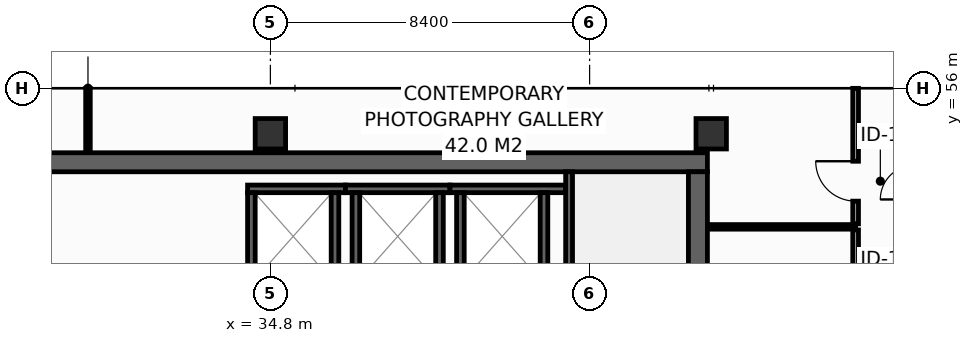
"""IFC4 building model, lengths in metres.
Left out: names, types, materials, properties, quantities, classifications, styles, units other than length and angle.
Written with IfcOpenShell. Run it as: python <this file> out.ifc"""

import sys

from ifc_helpers import new_model, si_unit, direction, frame, frame_2d, origin, origin_2d, place, context, subcontext, project, spatial, rectangle, hollow_rectangle, extrude, element, fill, save


model = new_model("IFC4")
c1 = context("Model", 3, precision=1e-05, world=origin(), true_north=direction((0.0, 1.0)))
c2 = subcontext(c1, "Body", "Model", "MODEL_VIEW")
j1 = project(units=[si_unit("LENGTHUNIT", "METRE"), si_unit("PLANEANGLEUNIT", "RADIAN")], contexts=[c1])
p1 = place(None, origin())
s1 = spatial("IfcSite", under=j1, at=p1, CompositionType="ELEMENT")
p2 = place(p1, origin())
s2 = spatial("IfcBuilding", under=s1, at=p2, CompositionType="ELEMENT")
p3 = place(p2, frame((0.0, 0.0, 205.6)))
s3 = spatial("IfcBuildingStorey", under=s2, at=p3, CompositionType="ELEMENT", Elevation=205.6)
p4 = place(p3, frame((13.6, 54.05, 0.0), z_axis=(0.0, 0.0, 1.0), x_axis=(1.0, 0.0, 0.0)))
e1 = element("IfcWall", 1, at=p4, inside=s3, PredefinedType="SHEAR", context=c2, shape_type="SweptSolid", body=[
    extrude(rectangle(XDim=32.7, YDim=0.5, at=frame_2d((16.35, 0.0))), origin(), (0.0, 0.0, 1.0), 3.55),
])
p5 = place(p3, frame((46.05, 43.4, 0.0), z_axis=(0.0, 0.0, 1.0), x_axis=(0.0, 1.0, 0.0)))
e2 = element("IfcWall", 2, at=p5, inside=s3, PredefinedType="SHEAR", context=c2, shape_type="SweptSolid", body=[
    extrude(rectangle(XDim=10.4, YDim=0.5, at=frame_2d((5.2, 0.0))), origin(), (0.0, 0.0, 1.0), 3.55),
])
for number, where, z_axis, x_axis in (
    (3, (34.8, 54.8, 0.0), (0.0, 0.0, 1.0), (1.0, 0.0, 0.0)),
    (4, (46.4, 54.8, 0.0), (0.0, 0.0, 1.0), (1.0, 0.0, 0.0)),
):
    element("IfcColumn", number, at=place(p3, frame(where, z_axis=z_axis, x_axis=x_axis)), inside=s3, PredefinedType="COLUMN", context=c2, shape_type="SweptSolid", body=[
        extrude(hollow_rectangle(XDim=0.8, YDim=0.8, WallThickness=0.036, at=origin_2d()), origin(), (0.0, 0.0, 1.0), 3.8),
    ])
p6 = place(p3, frame((34.2, 53.35, 0.0), z_axis=(0.0, 0.0, 1.0), x_axis=(1.0, 0.0, 0.0)))
e5 = element("IfcWall", 5, at=p6, inside=s3, PredefinedType="SHEAR", context=c2, shape_type="SweptSolid", body=[
    extrude(rectangle(XDim=2.575, YDim=0.2, at=frame_2d((1.288, 0.0))), origin(), (0.0, 0.0, 1.0), 3.55),
])
for number, where, z_axis, x_axis in (
    (6, (34.3, 50.95, 0.0), (0.0, 0.0, 1.0), (0.0, 1.0, 0.0)),
    (7, (36.5, 50.95, 0.0), (0.0, 0.0, 1.0), (0.0, 1.0, 0.0)),
):
    element("IfcWall", number, at=place(p3, frame(where, z_axis=z_axis, x_axis=x_axis)), inside=s3, PredefinedType="SHEAR", context=c2, shape_type="SweptSolid", body=[
        extrude(rectangle(XDim=2.3, YDim=0.2, at=frame_2d((1.15, 0.0))), origin(), (0.0, 0.0, 1.0), 3.55),
    ])
p7 = place(p3, frame((36.775, 53.35, 0.0), z_axis=(0.0, 0.0, 1.0), x_axis=(1.0, 0.0, 0.0)))
e8 = element("IfcWall", 8, at=p7, inside=s3, PredefinedType="SHEAR", context=c2, shape_type="SweptSolid", body=[
    extrude(rectangle(XDim=2.75, YDim=0.2, at=frame_2d((1.375, 0.0))), origin(), (0.0, 0.0, 1.0), 3.55),
])
for number, where, z_axis, x_axis in (
    (9, (37.05, 50.95, 0.0), (0.0, 0.0, 1.0), (0.0, 1.0, 0.0)),
    (10, (39.25, 50.95, 0.0), (0.0, 0.0, 1.0), (0.0, 1.0, 0.0)),
):
    element("IfcWall", number, at=place(p3, frame(where, z_axis=z_axis, x_axis=x_axis)), inside=s3, PredefinedType="SHEAR", context=c2, shape_type="SweptSolid", body=[
        extrude(rectangle(XDim=2.3, YDim=0.2, at=frame_2d((1.15, 0.0))), origin(), (0.0, 0.0, 1.0), 3.55),
    ])
p8 = place(p3, frame((39.525, 53.35, 0.0), z_axis=(0.0, 0.0, 1.0), x_axis=(1.0, 0.0, 0.0)))
e11 = element("IfcWall", 11, at=p8, inside=s3, PredefinedType="SHEAR", context=c2, shape_type="SweptSolid", body=[
    extrude(rectangle(XDim=3.045, YDim=0.2, at=frame_2d((1.522, 0.0))), origin(), (0.0, 0.0, 1.0), 3.55),
])
for number, where, z_axis, x_axis in (
    (12, (39.8, 50.95, 0.0), (0.0, 0.0, 1.0), (0.0, 1.0, 0.0)),
    (13, (42.0, 50.95, 0.0), (0.0, 0.0, 1.0), (0.0, 1.0, 0.0)),
):
    element("IfcWall", number, at=place(p3, frame(where, z_axis=z_axis, x_axis=x_axis)), inside=s3, PredefinedType="SHEAR", context=c2, shape_type="SweptSolid", body=[
        extrude(rectangle(XDim=2.3, YDim=0.2, at=frame_2d((1.15, 0.0))), origin(), (0.0, 0.0, 1.0), 3.55),
    ])
p9 = place(p3, frame((42.66, 53.8, 0.0), z_axis=(0.0, 0.0, 1.0), x_axis=(0.0, -1.0, 0.0)))
e14 = element("IfcWall", 14, at=p9, inside=s3, PredefinedType="SHEAR", context=c2, shape_type="SweptSolid", body=[
    extrude(rectangle(XDim=10.4, YDim=0.18, at=frame_2d((5.2, 0.0))), origin(), (0.0, 0.0, 1.0), 3.55),
])
p10 = place(p9, frame((8.99, 0.0, 0.0)))
e15 = element("IfcOpeningElement", 15, at=p10, cuts=e14, PredefinedType="OPENING", context=c2, shape_type="SweptSolid", body=[
    extrude(rectangle(XDim=1.1, YDim=2.15, at=frame_2d((0.55, 1.075))), frame((0.0, 0.1, 0.0), z_axis=(0.0, -1.0, 0.0), x_axis=(1.0, 0.0, 0.0)), (0.0, 0.0, 1.0), 0.2),
])
p11 = place(p3, frame((46.32, 52.35, 0.0), z_axis=(0.0, 0.0, 1.0), x_axis=(1.0, 0.0, 0.0)))
e16 = element("IfcWall", 16, at=p11, inside=s3, PredefinedType="PARTITIONING", context=c2, shape_type="SweptSolid", body=[
    extrude(rectangle(XDim=3.88, YDim=0.12, at=frame_2d((1.94, 0.0))), origin(), (0.0, 0.0, 1.0), 3.55),
])
p12 = place(p3, frame((30.0, 54.32, 0.0), z_axis=(0.0, 0.0, 1.0), x_axis=(0.0, 1.0, 0.0)))
e17 = element("IfcWall", 17, at=p12, inside=s3, PredefinedType="PARTITIONING", context=c2, shape_type="SweptSolid", body=[
    extrude(rectangle(XDim=1.675, YDim=0.12, at=frame_2d((0.837, 0.0))), origin(), (0.0, 0.0, 1.0), 2.935),
])
p13 = place(p3, frame((50.2, 48.29, 0.0), z_axis=(0.0, 0.0, 1.0), x_axis=(0.0, 1.0, 0.0)))
e18 = element("IfcWall", 18, at=p13, inside=s3, PredefinedType="PARTITIONING", context=c2, shape_type="SweptSolid", body=[
    extrude(rectangle(XDim=3.98, YDim=0.15, at=frame_2d((1.99, 0.0))), origin(), (0.0, 0.0, 1.0), 3.55),
])
p14 = place(p13, frame((1.465, 0.0, 0.0)))
e19 = element("IfcOpeningElement", 19, at=p14, cuts=e18, PredefinedType="OPENING", context=c2, shape_type="SweptSolid", body=[
    extrude(rectangle(XDim=1.05, YDim=2.15, at=frame_2d((0.525, 1.075))), frame((0.0, 0.085, 0.0), z_axis=(0.0, -1.0, 0.0), x_axis=(1.0, 0.0, 0.0)), (0.0, 0.0, 1.0), 0.17),
])
p15 = place(p3, frame((50.2, 52.43, 0.0), z_axis=(0.0, 0.0, 1.0), x_axis=(0.0, 1.0, 0.0)))
e20 = element("IfcWall", 20, at=p15, inside=s3, PredefinedType="PARTITIONING", context=c2, shape_type="SweptSolid", body=[
    extrude(rectangle(XDim=3.565, YDim=0.15, at=frame_2d((1.783, 0.0))), origin(), (0.0, 0.0, 1.0), 2.935),
])
p16 = place(p15, frame((0.597, 0.0, 0.0)))
e21 = element("IfcOpeningElement", 21, at=p16, cuts=e20, PredefinedType="OPENING", context=c2, shape_type="SweptSolid", body=[
    extrude(rectangle(XDim=1.05, YDim=2.15, at=frame_2d((0.525, 1.075))), frame((0.0, 0.085, 0.0), z_axis=(0.0, -1.0, 0.0), x_axis=(1.0, 0.0, 0.0)), (0.0, 0.0, 1.0), 0.17),
])
p17 = place(p16, origin())
e22 = element("IfcDoor", 22, at=p17, inside=s3, OperationType="SINGLE_SWING_RIGHT", PredefinedType="DOOR", context=c2, shape_type="SweptSolid", body=[
    extrude(rectangle(XDim=1.05, YDim=2.15, at=frame_2d((0.525, 1.075))), frame((0.0, 0.025, 0.0), z_axis=(0.0, -1.0, 0.0), x_axis=(1.0, 0.0, 0.0)), (0.0, 0.0, 1.0), 0.05),
])
fill(e21, e22)
save(model, sys.argv[1])
